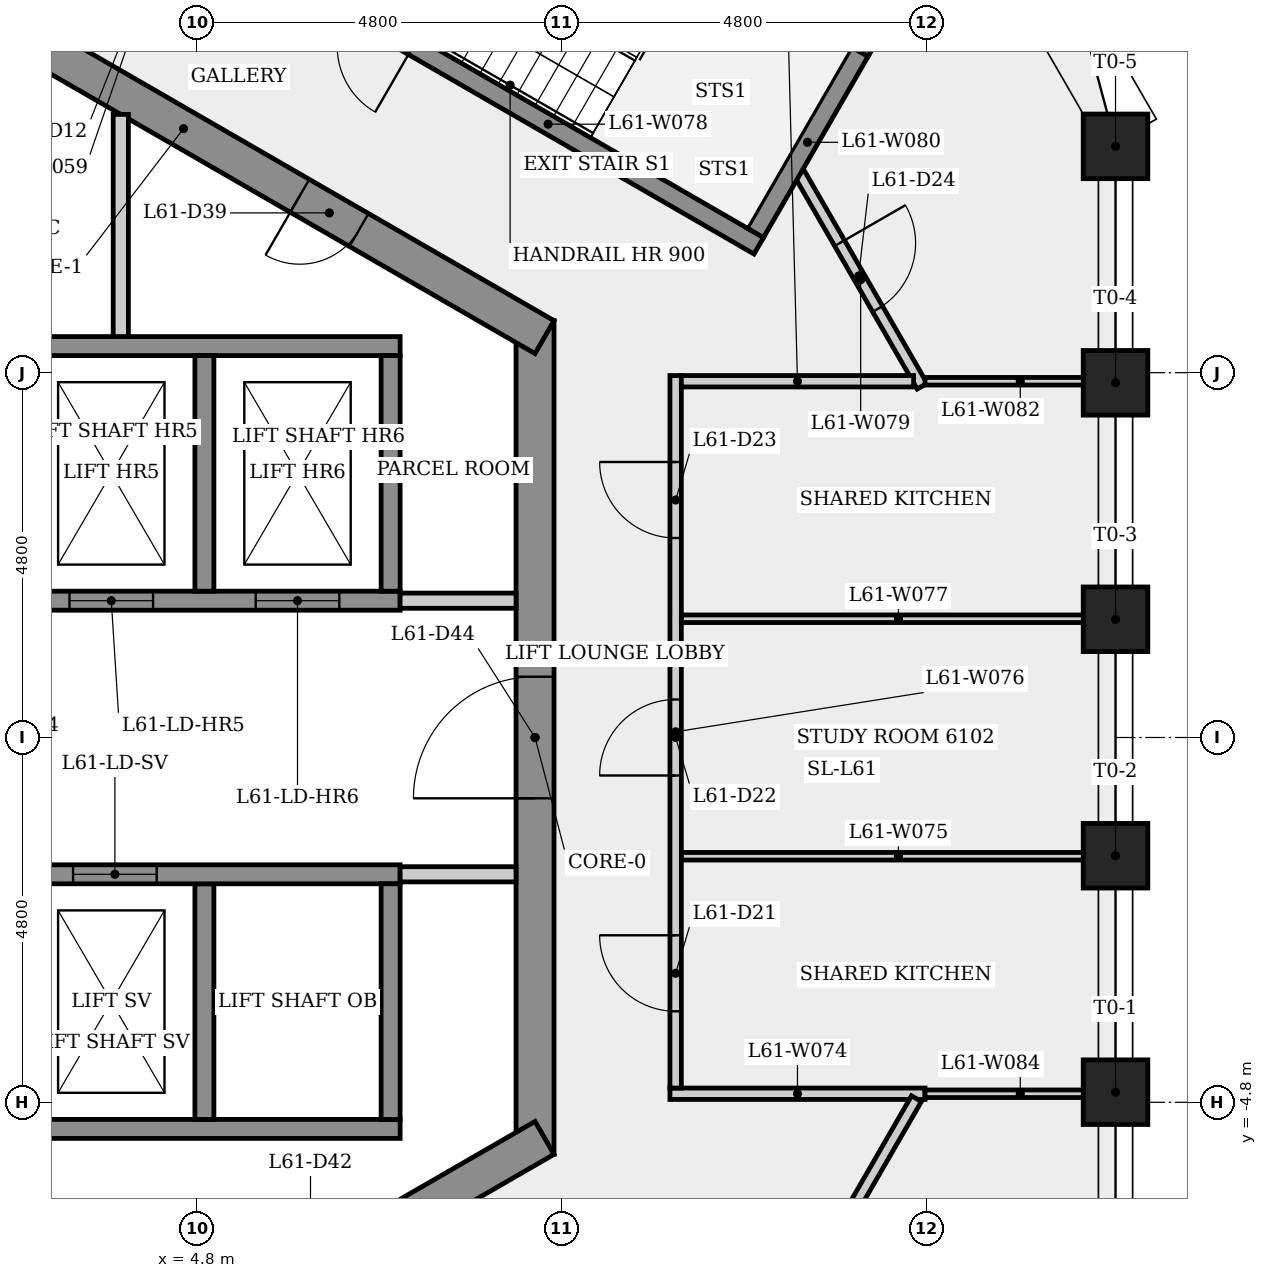
"""IFC4 building model, lengths in metres.
Left out: names, types, materials, properties, quantities, classifications, styles, units other than length and angle.
Written with IfcOpenShell. Run it as: python <this file> out.ifc"""

import sys

from ifc_helpers import new_model, si_unit, direction, frame, frame_2d, origin, origin_2d, place, context, subcontext, project, spatial, rectangle, extrude, element, fill, save


model = new_model("IFC4")
c1 = context("Model", 3, precision=1e-05, world=origin(), true_north=direction((0.0, 1.0)))
c2 = subcontext(c1, "Body", "Model", "MODEL_VIEW")
j1 = project(units=[si_unit("LENGTHUNIT", "METRE"), si_unit("PLANEANGLEUNIT", "RADIAN")], contexts=[c1])
p1 = place(None, origin())
s1 = spatial("IfcSite", under=j1, at=p1, CompositionType="ELEMENT")
p2 = place(p1, origin())
s2 = spatial("IfcBuilding", under=s1, at=p2, CompositionType="ELEMENT")
p3 = place(p2, frame((0.0, 0.0, 229.1)))
s3 = spatial("IfcBuildingStorey", under=s2, at=p3, CompositionType="ELEMENT", Elevation=229.1)
p4 = place(p3, frame((9.25, -5.485, 0.0), z_axis=(0.0, 0.0, 1.0), x_axis=(0.0, 1.0, 0.0)))
e1 = element("IfcWall", 1, at=p4, inside=s3, PredefinedType="SHEAR", context=c2, shape_type="SweptSolid", body=[
    extrude(rectangle(XDim=10.97, YDim=0.5, at=frame_2d((5.485, 0.0))), origin(), (0.0, 0.0, 1.0), 3.4),
])
p5 = place(p4, frame((4.685, 0.0, 0.0)))
e2 = element("IfcOpeningElement", 2, at=p5, cuts=e1, PredefinedType="OPENING", context=c2, shape_type="SweptSolid", body=[
    extrude(rectangle(XDim=1.6, YDim=2.1, at=frame_2d((0.8, 1.05))), frame((0.0, 0.26, 0.0), z_axis=(0.0, -1.0, 0.0), x_axis=(1.0, 0.0, 0.0)), (0.0, 0.0, 1.0), 0.52),
])
p6 = place(p3, frame((9.375, 5.268, 0.0), z_axis=(0.0, 0.0, 1.0), x_axis=(-0.866023993627, 0.500002442456, 0.0)))
e3 = element("IfcWall", 3, at=p6, inside=s3, PredefinedType="SHEAR", context=c2, shape_type="SweptSolid", body=[
    extrude(rectangle(XDim=10.97, YDim=0.5, at=frame_2d((5.485, 0.0))), origin(), (0.0, 0.0, 1.0), 3.4),
])
p7 = place(p6, frame((7.576, 0.0, 0.0)))
e4 = element("IfcOpeningElement", 4, at=p7, cuts=e3, PredefinedType="OPENING", context=c2, shape_type="SweptSolid", body=[
    extrude(rectangle(XDim=0.9, YDim=2.1, at=frame_2d((0.45, 1.05))), frame((0.0, 0.26, 0.0), z_axis=(0.0, -1.0, 0.0), x_axis=(1.0, 0.0, 0.0)), (0.0, 0.0, 1.0), 0.52),
])
p8 = place(p6, frame((2.818, 0.0, 0.0)))
e5 = element("IfcOpeningElement", 5, at=p8, cuts=e3, PredefinedType="OPENING", context=c2, shape_type="SweptSolid", body=[
    extrude(rectangle(XDim=0.9, YDim=2.1, at=frame_2d((0.45, 1.05))), frame((0.0, 0.26, 0.0), z_axis=(0.0, -1.0, 0.0), x_axis=(1.0, 0.0, 0.0)), (0.0, 0.0, 1.0), 0.52),
])
p9 = place(p3, frame((-0.125, -10.753, 0.0), z_axis=(0.0, 0.0, 1.0), x_axis=(0.866023993627, 0.500002442456, 0.0)))
e6 = element("IfcWall", 6, at=p9, inside=s3, PredefinedType="SHEAR", context=c2, shape_type="SweptSolid", body=[
    extrude(rectangle(XDim=10.97, YDim=0.5, at=frame_2d((5.485, 0.0))), origin(), (0.0, 0.0, 1.0), 3.4),
])
p10 = place(p9, frame((6.964, 0.0, 0.0)))
e7 = element("IfcOpeningElement", 7, at=p10, cuts=e6, PredefinedType="OPENING", context=c2, shape_type="SweptSolid", body=[
    extrude(rectangle(XDim=0.9, YDim=2.1, at=frame_2d((0.45, 1.05))), frame((0.0, 0.26, 0.0), z_axis=(0.0, -1.0, 0.0), x_axis=(1.0, 0.0, 0.0)), (0.0, 0.0, 1.0), 0.52),
])
for number, where, z_axis, x_axis in (
    (8, (16.887, -4.667, 0.0), (0.0, 0.0, 1.0), (1.0, 0.0, 0.0)),
    (9, (16.887, -1.556, 0.0), (0.0, 0.0, 1.0), (1.0, 0.0, 0.0)),
    (10, (16.887, 1.556, 0.0), (0.0, 0.0, 1.0), (1.0, 0.0, 0.0)),
    (11, (16.887, 4.667, 0.0), (0.0, 0.0, 1.0), (1.0, 0.0, 0.0)),
    (12, (16.887, 7.778, 0.0), (0.0, 0.0, 1.0), (1.0, 0.0, 0.0)),
):
    element("IfcColumn", number, at=place(p3, frame(where, z_axis=z_axis, x_axis=x_axis)), inside=s3, PredefinedType="COLUMN", context=c2, shape_type="SweptSolid", body=[
        extrude(rectangle(XDim=0.85, YDim=0.85, at=origin_2d()), origin(), (0.0, 0.0, 1.0), 3.4),
    ])
p11 = place(p3, frame((-7.475, 1.8, 0.0), z_axis=(0.0, 0.0, 1.0), x_axis=(1.0, 0.0, 0.0)))
e13 = element("IfcWall", 13, at=p11, inside=s3, PredefinedType="SHEAR", context=c2, shape_type="SweptSolid", body=[
    extrude(rectangle(XDim=14.95, YDim=0.25, at=frame_2d((7.475, 0.0))), origin(), (0.0, 0.0, 1.0), 3.05),
])
p12 = place(p11, frame((0.8, 0.0, 0.0)))
e14 = element("IfcOpeningElement", 14, at=p12, cuts=e13, PredefinedType="OPENING", context=c2, shape_type="SweptSolid", body=[
    extrude(rectangle(XDim=1.1, YDim=2.1, at=frame_2d((0.55, 1.05))), frame((0.0, 0.135, 0.0), z_axis=(0.0, -1.0, 0.0), x_axis=(1.0, 0.0, 0.0)), (0.0, 0.0, 1.0), 0.27),
])
p13 = place(p11, frame((3.25, 0.0, 0.0)))
e15 = element("IfcOpeningElement", 15, at=p13, cuts=e13, PredefinedType="OPENING", context=c2, shape_type="SweptSolid", body=[
    extrude(rectangle(XDim=1.1, YDim=2.1, at=frame_2d((0.55, 1.05))), frame((0.0, 0.135, 0.0), z_axis=(0.0, -1.0, 0.0), x_axis=(1.0, 0.0, 0.0)), (0.0, 0.0, 1.0), 0.27),
])
p14 = place(p11, frame((5.7, 0.0, 0.0)))
e16 = element("IfcOpeningElement", 16, at=p14, cuts=e13, PredefinedType="OPENING", context=c2, shape_type="SweptSolid", body=[
    extrude(rectangle(XDim=1.1, YDim=2.1, at=frame_2d((0.55, 1.05))), frame((0.0, 0.135, 0.0), z_axis=(0.0, -1.0, 0.0), x_axis=(1.0, 0.0, 0.0)), (0.0, 0.0, 1.0), 0.27),
])
p15 = place(p11, frame((8.15, 0.0, 0.0)))
e17 = element("IfcOpeningElement", 17, at=p15, cuts=e13, PredefinedType="OPENING", context=c2, shape_type="SweptSolid", body=[
    extrude(rectangle(XDim=1.1, YDim=2.1, at=frame_2d((0.55, 1.05))), frame((0.0, 0.135, 0.0), z_axis=(0.0, -1.0, 0.0), x_axis=(1.0, 0.0, 0.0)), (0.0, 0.0, 1.0), 0.27),
])
p16 = place(p11, frame((10.6, 0.0, 0.0)))
e18 = element("IfcOpeningElement", 18, at=p16, cuts=e13, PredefinedType="OPENING", context=c2, shape_type="SweptSolid", body=[
    extrude(rectangle(XDim=1.1, YDim=2.1, at=frame_2d((0.55, 1.05))), frame((0.0, 0.135, 0.0), z_axis=(0.0, -1.0, 0.0), x_axis=(1.0, 0.0, 0.0)), (0.0, 0.0, 1.0), 0.27),
])
p17 = place(p11, frame((13.05, 0.0, 0.0)))
e19 = element("IfcOpeningElement", 19, at=p17, cuts=e13, PredefinedType="OPENING", context=c2, shape_type="SweptSolid", body=[
    extrude(rectangle(XDim=1.1, YDim=2.1, at=frame_2d((0.55, 1.05))), frame((0.0, 0.135, 0.0), z_axis=(0.0, -1.0, 0.0), x_axis=(1.0, 0.0, 0.0)), (0.0, 0.0, 1.0), 0.27),
])
p18 = place(p3, frame((-7.225, 5.15, 0.0), z_axis=(0.0, 0.0, 1.0), x_axis=(1.0, 0.0, 0.0)))
e20 = element("IfcWall", 20, at=p18, inside=s3, PredefinedType="SHEAR", context=c2, shape_type="SweptSolid", body=[
    extrude(rectangle(XDim=14.7, YDim=0.25, at=frame_2d((7.35, 0.0))), origin(), (0.0, 0.0, 1.0), 3.05),
])
p19 = place(p3, frame((3.8, 8.198, 0.0), z_axis=(0.0, 0.0, 1.0), x_axis=(0.0, -1.0, 0.0)))
e21 = element("IfcWall", 21, at=p19, inside=s3, PredefinedType="PARTITIONING", context=c2, shape_type="SweptSolid", body=[
    extrude(rectangle(XDim=2.924, YDim=0.2, at=frame_2d((1.462, 0.0))), origin(), (0.0, 0.0, 1.0), 3.05),
])
p20 = place(p3, frame((2.575, -5.15, 0.0), z_axis=(0.0, 0.0, 1.0), x_axis=(1.0, 0.0, 0.0)))
e22 = element("IfcWall", 22, at=p20, inside=s3, PredefinedType="SHEAR", context=c2, shape_type="SweptSolid", body=[
    extrude(rectangle(XDim=4.9, YDim=0.25, at=frame_2d((2.45, 0.0))), origin(), (0.0, 0.0, 1.0), 3.05),
])
for number, where, z_axis, x_axis in (
    (23, (4.9, -1.925, 0.0), (0.0, 0.0, 1.0), (0.0, -1.0, 0.0)),
    (24, (4.9, 5.025, 0.0), (0.0, 0.0, 1.0), (0.0, -1.0, 0.0)),
):
    element("IfcWall", number, at=place(p3, frame(where, z_axis=z_axis, x_axis=x_axis)), inside=s3, PredefinedType="SHEAR", context=c2, shape_type="SweptSolid", body=[
        extrude(rectangle(XDim=3.1, YDim=0.25, at=frame_2d((1.55, 0.0))), origin(), (0.0, 0.0, 1.0), 3.4),
    ])
p21 = place(p3, frame((2.575, -1.8, 0.0), z_axis=(0.0, 0.0, 1.0), x_axis=(1.0, 0.0, 0.0)))
e25 = element("IfcWall", 25, at=p21, inside=s3, PredefinedType="SHEAR", context=c2, shape_type="SweptSolid", body=[
    extrude(rectangle(XDim=4.9, YDim=0.25, at=frame_2d((2.45, 0.0))), origin(), (0.0, 0.0, 1.0), 3.05),
])
p22 = place(p21, frame((0.597, 0.0, 0.0)))
e26 = element("IfcOpeningElement", 26, at=p22, cuts=e25, PredefinedType="OPENING", context=c2, shape_type="SweptSolid", body=[
    extrude(rectangle(XDim=1.1, YDim=2.1, at=frame_2d((0.55, 1.05))), frame((0.0, 0.135, 0.0), z_axis=(0.0, -1.0, 0.0), x_axis=(1.0, 0.0, 0.0)), (0.0, 0.0, 1.0), 0.27),
])
p23 = place(p3, frame((7.475, 1.8, 0.0), z_axis=(0.0, 0.0, 1.0), x_axis=(1.0, 0.0, 0.0)))
e27 = element("IfcWall", 27, at=p23, inside=s3, PredefinedType="PARTITIONING", context=c2, shape_type="SweptSolid", body=[
    extrude(rectangle(XDim=1.525, YDim=0.2, at=frame_2d((0.763, 0.0))), origin(), (0.0, 0.0, 1.0), 3.05),
])
for number, where, z_axis, x_axis in (
    (28, (7.35, -1.925, 0.0), (0.0, 0.0, 1.0), (0.0, -1.0, 0.0)),
    (29, (7.35, 5.025, 0.0), (0.0, 0.0, 1.0), (0.0, -1.0, 0.0)),
):
    element("IfcWall", number, at=place(p3, frame(where, z_axis=z_axis, x_axis=x_axis)), inside=s3, PredefinedType="SHEAR", context=c2, shape_type="SweptSolid", body=[
        extrude(rectangle(XDim=3.1, YDim=0.25, at=frame_2d((1.55, 0.0))), origin(), (0.0, 0.0, 1.0), 3.4),
    ])
p24 = place(p3, frame((8.151, 12.268, 0.0), z_axis=(0.0, 0.0, 1.0), x_axis=(0.866025499775, -0.499999833739, 0.0)))
e30 = element("IfcWall", 30, at=p24, inside=s3, PredefinedType="SHEAR", context=c2, shape_type="SweptSolid", body=[
    extrude(rectangle(XDim=6.4, YDim=0.25, at=frame_2d((3.2, 0.0))), origin(), (0.0, 0.0, 1.0), 3.05),
])
p25 = place(p3, frame((9.0, -1.8, 0.0), z_axis=(0.0, 0.0, 1.0), x_axis=(-1.0, 0.0, 0.0)))
e31 = element("IfcWall", 31, at=p25, inside=s3, PredefinedType="PARTITIONING", context=c2, shape_type="SweptSolid", body=[
    extrude(rectangle(XDim=1.525, YDim=0.2, at=frame_2d((0.763, 0.0))), origin(), (0.0, 0.0, 1.0), 3.05),
])
p26 = place(p3, frame((11.025, -4.688, 0.0), z_axis=(0.0, 0.0, 1.0), x_axis=(1.0, 0.0, 0.0)))
e32 = element("IfcWall", 32, at=p26, inside=s3, PredefinedType="PARTITIONING", context=c2, shape_type="SweptSolid", body=[
    extrude(rectangle(XDim=3.356, YDim=0.15, at=frame_2d((1.678, 0.0))), origin(), (0.0, 0.0, 1.0), 3.05),
])
p27 = place(p3, frame((11.175, -1.562, 0.0), z_axis=(0.0, 0.0, 1.0), x_axis=(1.0, 0.0, 0.0)))
e33 = element("IfcWall", 33, at=p27, inside=s3, PredefinedType="PARTITIONING", context=c2, shape_type="SweptSolid", body=[
    extrude(rectangle(XDim=5.712, YDim=0.1, at=frame_2d((2.856, 0.0))), origin(), (0.0, 0.0, 1.0), 3.05),
])
p28 = place(p3, frame((11.1, -4.612, 0.0), z_axis=(0.0, 0.0, 1.0), x_axis=(0.0, 1.0, 0.0)))
e34 = element("IfcWall", 34, at=p28, inside=s3, PredefinedType="PARTITIONING", context=c2, shape_type="SweptSolid", body=[
    extrude(rectangle(XDim=9.375, YDim=0.15, at=frame_2d((4.688, 0.0))), origin(), (0.0, 0.0, 1.0), 3.05),
])
p29 = place(p28, frame((1.01, 0.0, 0.0)))
e35 = element("IfcOpeningElement", 35, at=p29, cuts=e34, PredefinedType="OPENING", context=c2, shape_type="SweptSolid", body=[
    extrude(rectangle(XDim=1.0, YDim=2.1, at=frame_2d((0.5, 1.05))), frame((0.0, 0.085, 0.0), z_axis=(0.0, -1.0, 0.0), x_axis=(1.0, 0.0, 0.0)), (0.0, 0.0, 1.0), 0.17),
])
p30 = place(p28, frame((4.112, 0.0, 0.0)))
e36 = element("IfcOpeningElement", 36, at=p30, cuts=e34, PredefinedType="OPENING", context=c2, shape_type="SweptSolid", body=[
    extrude(rectangle(XDim=1.0, YDim=2.1, at=frame_2d((0.5, 1.05))), frame((0.0, 0.085, 0.0), z_axis=(0.0, -1.0, 0.0), x_axis=(1.0, 0.0, 0.0)), (0.0, 0.0, 1.0), 0.17),
])
p31 = place(p28, frame((7.237, 0.0, 0.0)))
e37 = element("IfcOpeningElement", 37, at=p31, cuts=e34, PredefinedType="OPENING", context=c2, shape_type="SweptSolid", body=[
    extrude(rectangle(XDim=1.0, YDim=2.1, at=frame_2d((0.5, 1.05))), frame((0.0, 0.085, 0.0), z_axis=(0.0, -1.0, 0.0), x_axis=(1.0, 0.0, 0.0)), (0.0, 0.0, 1.0), 0.17),
])
p32 = place(p3, frame((11.175, 1.562, 0.0), z_axis=(0.0, 0.0, 1.0), x_axis=(1.0, 0.0, 0.0)))
e38 = element("IfcWall", 38, at=p32, inside=s3, PredefinedType="PARTITIONING", context=c2, shape_type="SweptSolid", body=[
    extrude(rectangle(XDim=5.712, YDim=0.1, at=frame_2d((2.856, 0.0))), origin(), (0.0, 0.0, 1.0), 3.05),
])
p33 = place(p3, frame((12.194, 6.47, 0.0), z_axis=(0.0, 0.0, 1.0), x_axis=(-0.866025499775, 0.499999833739, 0.0)))
e39 = element("IfcWall", 39, at=p33, inside=s3, PredefinedType="SHEAR", context=c2, shape_type="SweptSolid", body=[
    extrude(rectangle(XDim=6.4, YDim=0.25, at=frame_2d((3.2, 0.0))), origin(), (0.0, 0.0, 1.0), 3.05),
])
p34 = place(p33, frame((5.25, 0.0, 0.0)))
e40 = element("IfcOpeningElement", 40, at=p34, cuts=e39, PredefinedType="OPENING", context=c2, shape_type="SweptSolid", body=[
    extrude(rectangle(XDim=1.0, YDim=2.1, at=frame_2d((0.5, 1.05))), frame((0.0, 0.135, 0.0), z_axis=(0.0, -1.0, 0.0), x_axis=(1.0, 0.0, 0.0)), (0.0, 0.0, 1.0), 0.27),
])
p35 = place(p3, frame((12.726, 7.425, 0.0), z_axis=(0.0, 0.0, 1.0), x_axis=(0.50000982419, -0.866019731711, 0.0)))
e41 = element("IfcWall", 41, at=p35, inside=s3, PredefinedType="PARTITIONING", context=c2, shape_type="SweptSolid", body=[
    extrude(rectangle(XDim=3.236, YDim=0.15, at=frame_2d((1.618, 0.0))), origin(), (0.0, 0.0, 1.0), 3.05),
])
p36 = place(p35, frame((1.063, 0.0, 0.0)))
e42 = element("IfcOpeningElement", 42, at=p36, cuts=e41, PredefinedType="OPENING", context=c2, shape_type="SweptSolid", body=[
    extrude(rectangle(XDim=1.0, YDim=2.1, at=frame_2d((0.5, 1.05))), frame((0.0, 0.085, 0.0), z_axis=(0.0, -1.0, 0.0), x_axis=(1.0, 0.0, 0.0)), (0.0, 0.0, 1.0), 0.17),
])
p37 = place(p3, frame((12.148, 6.641, 0.0), z_axis=(0.0, 0.0, 1.0), x_axis=(0.500034990121, 0.866005201286, 0.0)))
e43 = element("IfcWall", 43, at=p37, inside=s3, PredefinedType="SHEAR", context=c2, shape_type="SweptSolid", body=[
    extrude(rectangle(XDim=2.75, YDim=0.25, at=frame_2d((1.375, 0.0))), origin(), (0.0, 0.0, 1.0), 3.05),
])
p38 = place(p3, frame((14.231, 4.688, 0.0), z_axis=(0.0, 0.0, 1.0), x_axis=(-1.0, 0.0, 0.0)))
e44 = element("IfcWall", 44, at=p38, inside=s3, PredefinedType="PARTITIONING", context=c2, shape_type="SweptSolid", body=[
    extrude(rectangle(XDim=3.056, YDim=0.15, at=frame_2d((1.528, 0.0))), origin(), (0.0, 0.0, 1.0), 3.05),
])
p39 = place(p3, frame((14.381, 4.688, 0.0), z_axis=(0.0, 0.0, 1.0), x_axis=(1.0, 0.0, 0.0)))
e45 = element("IfcWall", 45, at=p39, inside=s3, PredefinedType="PARTITIONING", context=c2, shape_type="SweptSolid", body=[
    extrude(rectangle(XDim=2.506, YDim=0.1, at=frame_2d((1.253, 0.0))), origin(), (0.0, 0.0, 1.0), 3.05),
])
p40 = place(p3, frame((14.269, -4.752, 0.0), z_axis=(0.0, 0.0, 1.0), x_axis=(-0.50001280117, -0.866018012899, 0.0)))
e46 = element("IfcWall", 46, at=p40, inside=s3, PredefinedType="PARTITIONING", context=c2, shape_type="SweptSolid", body=[
    extrude(rectangle(XDim=6.575, YDim=0.15, at=frame_2d((3.288, 0.0))), origin(), (0.0, 0.0, 1.0), 3.05),
])
p41 = place(p40, frame((2.788, 0.0, 0.0)))
e47 = element("IfcOpeningElement", 47, at=p41, cuts=e46, PredefinedType="OPENING", context=c2, shape_type="SweptSolid", body=[
    extrude(rectangle(XDim=1.0, YDim=2.1, at=frame_2d((0.5, 1.05))), frame((0.0, 0.085, 0.0), z_axis=(0.0, -1.0, 0.0), x_axis=(1.0, 0.0, 0.0)), (0.0, 0.0, 1.0), 0.17),
])
p42 = place(p3, frame((16.887, -4.688, 0.0), z_axis=(0.0, 0.0, 1.0), x_axis=(-1.0, 0.0, 0.0)))
e48 = element("IfcWall", 48, at=p42, inside=s3, PredefinedType="PARTITIONING", context=c2, shape_type="SweptSolid", body=[
    extrude(rectangle(XDim=2.507, YDim=0.1, at=frame_2d((1.253, 0.0))), origin(), (0.0, 0.0, 1.0), 3.05),
])
p43 = place(p16, origin())
e49 = element("IfcDoor", 49, at=p43, inside=s3, OperationType="SLIDING_TO_LEFT", PredefinedType="DOOR", context=c2, shape_type="SweptSolid", body=[
    extrude(rectangle(XDim=1.1, YDim=2.1, at=frame_2d((0.55, 1.05))), frame((0.0, 0.025, 0.0), z_axis=(0.0, -1.0, 0.0), x_axis=(1.0, 0.0, 0.0)), (0.0, 0.0, 1.0), 0.05),
])
fill(e18, e49)
p44 = place(p17, origin())
e50 = element("IfcDoor", 50, at=p44, inside=s3, OperationType="SLIDING_TO_LEFT", PredefinedType="DOOR", context=c2, shape_type="SweptSolid", body=[
    extrude(rectangle(XDim=1.1, YDim=2.1, at=frame_2d((0.55, 1.05))), frame((0.0, 0.025, 0.0), z_axis=(0.0, -1.0, 0.0), x_axis=(1.0, 0.0, 0.0)), (0.0, 0.0, 1.0), 0.05),
])
fill(e19, e50)
p45 = place(p22, origin())
e51 = element("IfcDoor", 51, at=p45, inside=s3, OperationType="SLIDING_TO_LEFT", PredefinedType="DOOR", context=c2, shape_type="SweptSolid", body=[
    extrude(rectangle(XDim=1.1, YDim=2.1, at=frame_2d((0.55, 1.05))), frame((0.0, 0.025, 0.0), z_axis=(0.0, -1.0, 0.0), x_axis=(1.0, 0.0, 0.0)), (0.0, 0.0, 1.0), 0.05),
])
fill(e26, e51)
p46 = place(p29, origin())
e52 = element("IfcDoor", 52, at=p46, inside=s3, OperationType="SINGLE_SWING_RIGHT", PredefinedType="DOOR", context=c2, shape_type="SweptSolid", body=[
    extrude(rectangle(XDim=1.0, YDim=2.1, at=frame_2d((0.5, 1.05))), frame((0.0, 0.025, 0.0), z_axis=(0.0, -1.0, 0.0), x_axis=(1.0, 0.0, 0.0)), (0.0, 0.0, 1.0), 0.05),
])
fill(e35, e52)
p47 = place(p30, origin())
e53 = element("IfcDoor", 53, at=p47, inside=s3, OperationType="SINGLE_SWING_LEFT", PredefinedType="DOOR", context=c2, shape_type="SweptSolid", body=[
    extrude(rectangle(XDim=1.0, YDim=2.1, at=frame_2d((0.5, 1.05))), frame((0.0, 0.025, 0.0), z_axis=(0.0, -1.0, 0.0), x_axis=(1.0, 0.0, 0.0)), (0.0, 0.0, 1.0), 0.05),
])
fill(e36, e53)
p48 = place(p31, origin())
e54 = element("IfcDoor", 54, at=p48, inside=s3, OperationType="SINGLE_SWING_RIGHT", PredefinedType="DOOR", context=c2, shape_type="SweptSolid", body=[
    extrude(rectangle(XDim=1.0, YDim=2.1, at=frame_2d((0.5, 1.05))), frame((0.0, 0.025, 0.0), z_axis=(0.0, -1.0, 0.0), x_axis=(1.0, 0.0, 0.0)), (0.0, 0.0, 1.0), 0.05),
])
fill(e37, e54)
p49 = place(p36, origin())
e55 = element("IfcDoor", 55, at=p49, inside=s3, OperationType="SINGLE_SWING_LEFT", PredefinedType="DOOR", context=c2, shape_type="SweptSolid", body=[
    extrude(rectangle(XDim=1.0, YDim=2.1, at=frame_2d((0.5, 1.05))), frame((0.0, 0.025, 0.0), z_axis=(0.0, -1.0, 0.0), x_axis=(1.0, 0.0, 0.0)), (0.0, 0.0, 1.0), 0.05),
])
fill(e42, e55)
p50 = place(p8, origin())
e56 = element("IfcDoor", 56, at=p50, inside=s3, OperationType="SINGLE_SWING_RIGHT", PredefinedType="DOOR", context=c2, shape_type="SweptSolid", body=[
    extrude(rectangle(XDim=0.9, YDim=2.1, at=frame_2d((0.45, 1.05))), frame((0.0, 0.025, 0.0), z_axis=(0.0, -1.0, 0.0), x_axis=(1.0, 0.0, 0.0)), (0.0, 0.0, 1.0), 0.05),
])
fill(e5, e56)
p51 = place(p5, origin())
e57 = element("IfcDoor", 57, at=p51, inside=s3, OperationType="SINGLE_SWING_LEFT", PredefinedType="DOOR", context=c2, shape_type="SweptSolid", body=[
    extrude(rectangle(XDim=1.6, YDim=2.1, at=frame_2d((0.8, 1.05))), frame((0.0, 0.025, 0.0), z_axis=(0.0, -1.0, 0.0), x_axis=(1.0, 0.0, 0.0)), (0.0, 0.0, 1.0), 0.05),
])
fill(e2, e57)
save(model, sys.argv[1])
